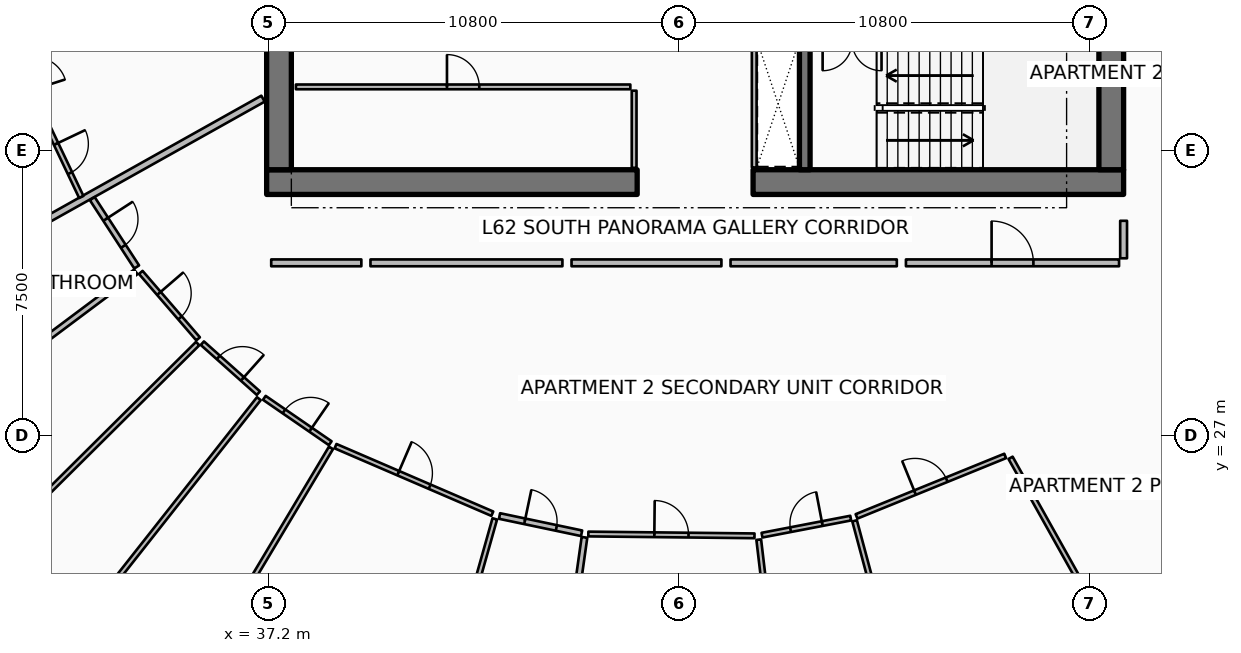
"""IFC4 building model, lengths in metres.
Left out: names, types, materials, properties, quantities, classifications, styles, units other than length and angle.
Written with IfcOpenShell. Run it as: python <this file> out.ifc"""

import sys

from ifc_helpers import new_model, si_unit, direction, frame, frame_2d, origin, place, context, subcontext, project, spatial, rectangle, extrude, element, fill, save


model = new_model("IFC4")
c1 = context("Model", 3, precision=1e-05, world=origin(), true_north=direction((0.0, 1.0)))
c2 = subcontext(c1, "Body", "Model", "MODEL_VIEW")
j1 = project(units=[si_unit("LENGTHUNIT", "METRE"), si_unit("PLANEANGLEUNIT", "RADIAN")], contexts=[c1])
p1 = place(None, origin())
s1 = spatial("IfcSite", under=j1, at=p1, CompositionType="ELEMENT")
p2 = place(p1, origin())
s2 = spatial("IfcBuilding", under=s1, at=p2, CompositionType="ELEMENT")
p3 = place(p2, frame((0.0, 0.0, 248.25)))
s3 = spatial("IfcBuildingStorey", under=s2, at=p3, CompositionType="ELEMENT", Elevation=248.25)
for number, where, z_axis, x_axis in (
    (1, (37.15, 33.675, 0.0), (0.0, 0.0, 1.0), (1.0, 0.0, 0.0)),
    (2, (49.95, 33.675, 0.0), (0.0, 0.0, 1.0), (1.0, 0.0, 0.0)),
):
    element("IfcWall", number, at=place(p3, frame(where, z_axis=z_axis, x_axis=x_axis)), inside=s3, PredefinedType="SHEAR", context=c2, shape_type="SweptSolid", body=[
        extrude(rectangle(XDim=9.75, YDim=0.65, at=frame_2d((4.875, 0.0))), origin(), (0.0, 0.0, 1.0), 3.85),
    ])
for number, where, z_axis, x_axis in (
    (3, (37.475, 34.0, 0.0), (0.0, 0.0, 1.0), (0.0, 1.0, 0.0)),
    (4, (59.375, 34.0, 0.0), (0.0, 0.0, 1.0), (0.0, 1.0, 0.0)),
):
    element("IfcWall", number, at=place(p3, frame(where, z_axis=z_axis, x_axis=x_axis)), inside=s3, PredefinedType="SHEAR", context=c2, shape_type="SweptSolid", body=[
        extrude(rectangle(XDim=16.0, YDim=0.65, at=frame_2d((8.0, 0.0))), origin(), (0.0, 0.0, 1.0), 3.85),
    ])
p4 = place(p3, frame((51.31, 34.0, 0.0), z_axis=(0.0, 0.0, 1.0), x_axis=(0.0, 1.0, 0.0)))
e5 = element("IfcWall", 5, at=p4, inside=s3, PredefinedType="SHEAR", context=c2, shape_type="SweptSolid", body=[
    extrude(rectangle(XDim=3.5, YDim=0.28, at=frame_2d((1.75, 0.0))), origin(), (0.0, 0.0, 1.0), 3.85),
])
p5 = place(p3, frame((46.82, 34.05, 0.0), z_axis=(0.0, 0.0, 1.0), x_axis=(0.0, 1.0, 0.0)))
e6 = element("IfcWall", 6, at=p5, inside=s3, PredefinedType="PARTITIONING", context=c2, shape_type="SweptSolid", body=[
    extrude(rectangle(XDim=2.03, YDim=0.125, at=frame_2d((1.015, 0.0))), origin(), (0.0, 0.0, 1.0), 3.03),
])
p6 = place(p3, frame((37.92, 36.18, 0.0), z_axis=(0.0, 0.0, 1.0), x_axis=(1.0, 0.0, 0.0)))
e7 = element("IfcWall", 7, at=p6, inside=s3, PredefinedType="PARTITIONING", context=c2, shape_type="SweptSolid", body=[
    extrude(rectangle(XDim=8.8, YDim=0.125, at=frame_2d((4.4, 0.0))), origin(), (0.0, 0.0, 1.0), 3.03),
])
p7 = place(p6, frame((3.975, 0.0, 0.0)))
e8 = element("IfcOpeningElement", 8, at=p7, cuts=e7, PredefinedType="OPENING", context=c2, shape_type="SweptSolid", body=[
    extrude(rectangle(XDim=0.85, YDim=2.06, at=frame_2d((0.425, 1.03))), frame((0.0, 0.073, 0.0), z_axis=(0.0, -1.0, 0.0), x_axis=(1.0, 0.0, 0.0)), (0.0, 0.0, 1.0), 0.145),
])
p8 = place(p3, frame((49.98, 34.06, 0.0), z_axis=(0.0, 0.0, 1.0), x_axis=(0.0, 1.0, 0.0)))
e9 = element("IfcWall", 9, at=p8, inside=s3, PredefinedType="PARTITIONING", context=c2, shape_type="SweptSolid", body=[
    extrude(rectangle(XDim=3.4, YDim=0.125, at=frame_2d((1.7, 0.0))), origin(), (0.0, 0.0, 1.0), 3.03),
])
p9 = place(p3, frame((37.054, 35.87, 0.0), z_axis=(0.0, 0.0, 1.0), x_axis=(-0.872490186067, -0.488631635506, 0.0)))
e10 = element("IfcWall", 10, at=p9, inside=s3, PredefinedType="PARTITIONING", context=c2, shape_type="SweptSolid", body=[
    extrude(rectangle(XDim=17.884, YDim=0.18, at=frame_2d((8.942, 0.0))), origin(), (0.0, 0.0, 1.0), 2.957),
])
p10 = place(p3, frame((31.31, 35.306, 0.0), z_axis=(0.0, 0.0, 1.0), x_axis=(0.429468098594, -0.903082029657, 0.0)))
e11 = element("IfcWall", 11, at=p10, inside=s3, PredefinedType="PARTITIONING", context=c2, shape_type="SweptSolid", body=[
    extrude(rectangle(XDim=2.24, YDim=0.125, at=frame_2d((1.12, 0.0))), origin(), (0.0, 0.0, 1.0), 2.957),
])
p11 = place(p10, frame((0.695, 0.0, 0.0)))
e12 = element("IfcOpeningElement", 12, at=p11, cuts=e11, PredefinedType="OPENING", context=c2, shape_type="SweptSolid", body=[
    extrude(rectangle(XDim=0.85, YDim=2.06, at=frame_2d((0.425, 1.03))), frame((0.0, 0.073, 0.0), z_axis=(0.0, -1.0, 0.0), x_axis=(1.0, 0.0, 0.0)), (0.0, 0.0, 1.0), 0.145),
])
p12 = place(p3, frame((53.972, 31.55, 0.0), z_axis=(0.0, 0.0, 1.0), x_axis=(1.0, 0.0, 0.0)))
e13 = element("IfcWall", 13, at=p12, inside=s3, PredefinedType="PARTITIONING", context=c2, shape_type="SweptSolid", body=[
    extrude(rectangle(XDim=5.608, YDim=0.18, at=frame_2d((2.804, 0.0))), origin(), (0.0, 0.0, 1.0), 2.957),
])
p13 = place(p12, frame((2.254, 0.0, 0.0)))
e14 = element("IfcOpeningElement", 14, at=p13, cuts=e13, PredefinedType="OPENING", context=c2, shape_type="SweptSolid", body=[
    extrude(rectangle(XDim=1.1, YDim=2.1, at=frame_2d((0.55, 1.05))), frame((0.0, 0.1, 0.0), z_axis=(0.0, -1.0, 0.0), x_axis=(1.0, 0.0, 0.0)), (0.0, 0.0, 1.0), 0.2),
])
p14 = place(p3, frame((59.7, 31.67, 0.0), z_axis=(0.0, 0.0, 1.0), x_axis=(0.0, 1.0, 0.0)))
e15 = element("IfcWall", 15, at=p14, inside=s3, PredefinedType="PARTITIONING", context=c2, shape_type="SweptSolid", body=[
    extrude(rectangle(XDim=0.987, YDim=0.18, at=frame_2d((0.493, 0.0))), origin(), (0.0, 0.0, 1.0), 2.957),
])
p15 = place(p3, frame((37.27, 31.55, 0.0), z_axis=(0.0, 0.0, 1.0), x_axis=(1.0, 0.0, 0.0)))
e16 = element("IfcWall", 16, at=p15, inside=s3, PredefinedType="PARTITIONING", context=c2, shape_type="SweptSolid", body=[
    extrude(rectangle(XDim=2.372, YDim=0.18, at=frame_2d((1.186, 0.0))), origin(), (0.0, 0.0, 1.0), 2.957),
])
p16 = place(p3, frame((32.562, 33.24, 0.0), z_axis=(0.0, 0.0, 1.0), x_axis=(0.544888302375, -0.838508639154, 0.0)))
e17 = element("IfcWall", 17, at=p16, inside=s3, PredefinedType="PARTITIONING", context=c2, shape_type="SweptSolid", body=[
    extrude(rectangle(XDim=2.144, YDim=0.15, at=frame_2d((1.072, 0.0))), origin(), (0.0, 0.0, 1.0), 2.957),
])
p17 = place(p16, frame((0.647, 0.0, 0.0)))
e18 = element("IfcOpeningElement", 18, at=p17, cuts=e17, PredefinedType="OPENING", context=c2, shape_type="SweptSolid", body=[
    extrude(rectangle(XDim=0.85, YDim=2.06, at=frame_2d((0.425, 1.03))), frame((0.0, 0.085, 0.0), z_axis=(0.0, -1.0, 0.0), x_axis=(1.0, 0.0, 0.0)), (0.0, 0.0, 1.0), 0.17),
])
p18 = place(p3, frame((33.707, 31.312, 0.0), z_axis=(0.0, 0.0, 1.0), x_axis=(-0.800889069655, -0.598812740435, 0.0)))
e19 = element("IfcWall", 19, at=p18, inside=s3, PredefinedType="PARTITIONING", context=c2, shape_type="SweptSolid", body=[
    extrude(rectangle(XDim=3.72, YDim=0.15, at=frame_2d((1.86, 0.0))), origin(), (0.0, 0.0, 1.0), 3.03),
])
p19 = place(p3, frame((35.335, 29.426, 0.0), z_axis=(0.0, 0.0, 1.0), x_axis=(-0.709660425086, -0.704543881576, 0.0)))
e20 = element("IfcWall", 20, at=p19, inside=s3, PredefinedType="PARTITIONING", context=c2, shape_type="SweptSolid", body=[
    extrude(rectangle(XDim=11.738, YDim=0.125, at=frame_2d((5.869, 0.0))), origin(), (0.0, 0.0, 1.0), 3.03),
])
p20 = place(p3, frame((33.838, 31.298, 0.0), z_axis=(0.0, 0.0, 1.0), x_axis=(0.653278423857, -0.757117758954, 0.0)))
e21 = element("IfcWall", 21, at=p20, inside=s3, PredefinedType="PARTITIONING", context=c2, shape_type="SweptSolid", body=[
    extrude(rectangle(XDim=2.309, YDim=0.125, at=frame_2d((1.154, 0.0))), origin(), (0.0, 0.0, 1.0), 3.03),
])
p21 = place(p20, frame((0.729, 0.0, 0.0)))
e22 = element("IfcOpeningElement", 22, at=p21, cuts=e21, PredefinedType="OPENING", context=c2, shape_type="SweptSolid", body=[
    extrude(rectangle(XDim=0.85, YDim=2.06, at=frame_2d((0.425, 1.03))), frame((0.0, 0.073, 0.0), z_axis=(0.0, -1.0, 0.0), x_axis=(1.0, 0.0, 0.0)), (0.0, 0.0, 1.0), 0.145),
])
p22 = place(p3, frame((35.458, 29.436, 0.0), z_axis=(0.0, 0.0, 1.0), x_axis=(0.746255603185, -0.665659503586, 0.0)))
e23 = element("IfcWall", 23, at=p22, inside=s3, PredefinedType="PARTITIONING", context=c2, shape_type="SweptSolid", body=[
    extrude(rectangle(XDim=1.975, YDim=0.125, at=frame_2d((0.988, 0.0))), origin(), (0.0, 0.0, 1.0), 2.957),
])
p23 = place(p22, frame((0.562, 0.0, 0.0)))
e24 = element("IfcOpeningElement", 24, at=p23, cuts=e23, PredefinedType="OPENING", context=c2, shape_type="SweptSolid", body=[
    extrude(rectangle(XDim=0.85, YDim=2.06, at=frame_2d((0.425, 1.03))), frame((0.0, 0.073, 0.0), z_axis=(0.0, -1.0, 0.0), x_axis=(1.0, 0.0, 0.0)), (0.0, 0.0, 1.0), 0.145),
])
p24 = place(p3, frame((39.882, 31.55, 0.0), z_axis=(0.0, 0.0, 1.0), x_axis=(1.0, 0.0, 0.0)))
e25 = element("IfcWall", 25, at=p24, inside=s3, PredefinedType="PARTITIONING", context=c2, shape_type="SweptSolid", body=[
    extrude(rectangle(XDim=5.051, YDim=0.18, at=frame_2d((2.525, 0.0))), origin(), (0.0, 0.0, 1.0), 2.957),
])
p25 = place(p3, frame((36.945, 27.977, 0.0), z_axis=(0.0, 0.0, 1.0), x_axis=(-0.619096573209, -0.785314862358, 0.0)))
e26 = element("IfcWall", 26, at=p25, inside=s3, PredefinedType="PARTITIONING", context=c2, shape_type="SweptSolid", body=[
    extrude(rectangle(XDim=11.739, YDim=0.125, at=frame_2d((5.869, 0.0))), origin(), (0.0, 0.0, 1.0), 2.957),
])
p26 = place(p3, frame((38.843, 26.681, 0.0), z_axis=(0.0, 0.0, 1.0), x_axis=(-0.513080899873, -0.858340253154, 0.0)))
e27 = element("IfcWall", 27, at=p26, inside=s3, PredefinedType="PARTITIONING", context=c2, shape_type="SweptSolid", body=[
    extrude(rectangle(XDim=10.282, YDim=0.125, at=frame_2d((5.141, 0.0))), origin(), (0.0, 0.0, 1.0), 3.03),
])
p27 = place(p3, frame((37.089, 27.998, 0.0), z_axis=(0.0, 0.0, 1.0), x_axis=(0.823534084839, -0.567266790063, 0.0)))
e28 = element("IfcWall", 28, at=p27, inside=s3, PredefinedType="PARTITIONING", context=c2, shape_type="SweptSolid", body=[
    extrude(rectangle(XDim=2.105, YDim=0.125, at=frame_2d((1.053, 0.0))), origin(), (0.0, 0.0, 1.0), 2.957),
])
p28 = place(p27, frame((0.628, 0.0, 0.0)))
e29 = element("IfcOpeningElement", 29, at=p28, cuts=e28, PredefinedType="OPENING", context=c2, shape_type="SweptSolid", body=[
    extrude(rectangle(XDim=0.85, YDim=2.06, at=frame_2d((0.425, 1.03))), frame((0.0, 0.073, 0.0), z_axis=(0.0, -1.0, 0.0), x_axis=(1.0, 0.0, 0.0)), (0.0, 0.0, 1.0), 0.145),
])
p29 = place(p3, frame((38.962, 26.727, 0.0), z_axis=(0.0, 0.0, 1.0), x_axis=(0.918384361194, -0.395689480671, 0.0)))
e30 = element("IfcWall", 30, at=p29, inside=s3, PredefinedType="PARTITIONING", context=c2, shape_type="SweptSolid", body=[
    extrude(rectangle(XDim=4.492, YDim=0.125, at=frame_2d((2.246, 0.0))), origin(), (0.0, 0.0, 1.0), 2.957),
])
p30 = place(p29, frame((1.796, 0.0, 0.0)))
e31 = element("IfcOpeningElement", 31, at=p30, cuts=e30, PredefinedType="OPENING", context=c2, shape_type="SweptSolid", body=[
    extrude(rectangle(XDim=0.9, YDim=2.08, at=frame_2d((0.45, 1.04))), frame((0.0, 0.073, 0.0), z_axis=(0.0, -1.0, 0.0), x_axis=(1.0, 0.0, 0.0)), (0.0, 0.0, 1.0), 0.145),
])
p31 = place(p3, frame((45.173, 31.55, 0.0), z_axis=(0.0, 0.0, 1.0), x_axis=(1.0, 0.0, 0.0)))
e32 = element("IfcWall", 32, at=p31, inside=s3, PredefinedType="PARTITIONING", context=c2, shape_type="SweptSolid", body=[
    extrude(rectangle(XDim=3.944, YDim=0.18, at=frame_2d((1.972, 0.0))), origin(), (0.0, 0.0, 1.0), 2.957),
])
p32 = place(p3, frame((43.153, 24.813, 0.0), z_axis=(0.0, 0.0, 1.0), x_axis=(-0.271434117828, -0.96245702225, 0.0)))
e33 = element("IfcWall", 33, at=p32, inside=s3, PredefinedType="PARTITIONING", context=c2, shape_type="SweptSolid", body=[
    extrude(rectangle(XDim=9.128, YDim=0.125, at=frame_2d((4.564, 0.0))), origin(), (0.0, 0.0, 1.0), 2.957),
])
p33 = place(p3, frame((43.278, 24.889, 0.0), z_axis=(0.0, 0.0, 1.0), x_axis=(0.978579118273, -0.205871098701, 0.0)))
e34 = element("IfcWall", 34, at=p33, inside=s3, PredefinedType="PARTITIONING", context=c2, shape_type="SweptSolid", body=[
    extrude(rectangle(XDim=2.207, YDim=0.15, at=frame_2d((1.104, 0.0))), origin(), (0.0, 0.0, 1.0), 2.957),
])
p34 = place(p33, frame((0.678, 0.0, 0.0)))
e35 = element("IfcOpeningElement", 35, at=p34, cuts=e34, PredefinedType="OPENING", context=c2, shape_type="SweptSolid", body=[
    extrude(rectangle(XDim=0.85, YDim=2.06, at=frame_2d((0.425, 1.03))), frame((0.0, 0.085, 0.0), z_axis=(0.0, -1.0, 0.0), x_axis=(1.0, 0.0, 0.0)), (0.0, 0.0, 1.0), 0.17),
])
p35 = place(p3, frame((45.513, 24.327, 0.0), z_axis=(0.0, 0.0, 1.0), x_axis=(-0.139367219172, -0.990240767804, 0.0)))
e36 = element("IfcWall", 36, at=p35, inside=s3, PredefinedType="PARTITIONING", context=c2, shape_type="SweptSolid", body=[
    extrude(rectangle(XDim=4.46, YDim=0.15, at=frame_2d((2.23, 0.0))), origin(), (0.0, 0.0, 1.0), 3.03),
])
p36 = place(p3, frame((45.615, 24.415, 0.0), z_axis=(0.0, 0.0, 1.0), x_axis=(0.999939484605, -0.011001233021, 0.0)))
e37 = element("IfcWall", 37, at=p36, inside=s3, PredefinedType="PARTITIONING", context=c2, shape_type="SweptSolid", body=[
    extrude(rectangle(XDim=4.372, YDim=0.125, at=frame_2d((2.186, 0.0))), origin(), (0.0, 0.0, 1.0), 3.03),
])
p37 = place(p36, frame((1.736, 0.0, 0.0)))
e38 = element("IfcOpeningElement", 38, at=p37, cuts=e37, PredefinedType="OPENING", context=c2, shape_type="SweptSolid", body=[
    extrude(rectangle(XDim=0.9, YDim=2.08, at=frame_2d((0.45, 1.04))), frame((0.0, 0.073, 0.0), z_axis=(0.0, -1.0, 0.0), x_axis=(1.0, 0.0, 0.0)), (0.0, 0.0, 1.0), 0.145),
])
p38 = place(p3, frame((49.357, 31.55, 0.0), z_axis=(0.0, 0.0, 1.0), x_axis=(1.0, 0.0, 0.0)))
e39 = element("IfcWall", 39, at=p38, inside=s3, PredefinedType="PARTITIONING", context=c2, shape_type="SweptSolid", body=[
    extrude(rectangle(XDim=4.376, YDim=0.18, at=frame_2d((2.188, 0.0))), origin(), (0.0, 0.0, 1.0), 2.957),
])
p39 = place(p3, frame((50.099, 24.267, 0.0), z_axis=(0.0, 0.0, 1.0), x_axis=(0.117541429875, -0.993067979679, 0.0)))
e40 = element("IfcWall", 40, at=p39, inside=s3, PredefinedType="PARTITIONING", context=c2, shape_type="SweptSolid", body=[
    extrude(rectangle(XDim=6.838, YDim=0.125, at=frame_2d((3.419, 0.0))), origin(), (0.0, 0.0, 1.0), 2.957),
])
p40 = place(p3, frame((56.725, 26.42, 0.0), z_axis=(0.0, 0.0, 1.0), x_axis=(0.488624332812, -0.872494275846, 0.0)))
e41 = element("IfcWall", 41, at=p40, inside=s3, PredefinedType="PARTITIONING", context=c2, shape_type="SweptSolid", body=[
    extrude(rectangle(XDim=6.738, YDim=0.125, at=frame_2d((3.369, 0.0))), origin(), (0.0, 0.0, 1.0), 2.957),
])
p41 = place(p3, frame((52.621, 24.762, 0.0), z_axis=(0.0, 0.0, 1.0), x_axis=(0.258970884365, -0.96588512829, 0.0)))
e42 = element("IfcWall", 42, at=p41, inside=s3, PredefinedType="PARTITIONING", context=c2, shape_type="SweptSolid", body=[
    extrude(rectangle(XDim=6.306, YDim=0.125, at=frame_2d((3.153, 0.0))), origin(), (0.0, 0.0, 1.0), 3.03),
])
p42 = place(p3, frame((50.185, 24.385, 0.0), z_axis=(0.0, 0.0, 1.0), x_axis=(0.982037935844, 0.188683577884, 0.0)))
e43 = element("IfcWall", 43, at=p42, inside=s3, PredefinedType="PARTITIONING", context=c2, shape_type="SweptSolid", body=[
    extrude(rectangle(XDim=2.377, YDim=0.125, at=frame_2d((1.188, 0.0))), origin(), (0.0, 0.0, 1.0), 2.957),
])
p43 = place(p42, frame((0.763, 0.0, 0.0)))
e44 = element("IfcOpeningElement", 44, at=p43, cuts=e43, PredefinedType="OPENING", context=c2, shape_type="SweptSolid", body=[
    extrude(rectangle(XDim=0.85, YDim=2.06, at=frame_2d((0.425, 1.03))), frame((0.0, 0.073, 0.0), z_axis=(0.0, -1.0, 0.0), x_axis=(1.0, 0.0, 0.0)), (0.0, 0.0, 1.0), 0.145),
])
p44 = place(p3, frame((52.672, 24.879, 0.0), z_axis=(0.0, 0.0, 1.0), x_axis=(0.926344303187, 0.376677888857, 0.0)))
e45 = element("IfcWall", 45, at=p44, inside=s3, PredefinedType="PARTITIONING", context=c2, shape_type="SweptSolid", body=[
    extrude(rectangle(XDim=4.223, YDim=0.125, at=frame_2d((2.111, 0.0))), origin(), (0.0, 0.0, 1.0), 2.957),
])
p45 = place(p44, frame((1.661, 0.0, 0.0)))
e46 = element("IfcOpeningElement", 46, at=p45, cuts=e45, PredefinedType="OPENING", context=c2, shape_type="SweptSolid", body=[
    extrude(rectangle(XDim=0.9, YDim=2.08, at=frame_2d((0.45, 1.04))), frame((0.0, 0.073, 0.0), z_axis=(0.0, -1.0, 0.0), x_axis=(1.0, 0.0, 0.0)), (0.0, 0.0, 1.0), 0.145),
])
p46 = place(p7, origin())
e47 = element("IfcDoor", 47, at=p46, inside=s3, OperationType="SINGLE_SWING_LEFT", PredefinedType="DOOR", context=c2, shape_type="SweptSolid", body=[
    extrude(rectangle(XDim=0.85, YDim=2.06, at=frame_2d((0.425, 1.03))), frame((0.0, 0.025, 0.0), z_axis=(0.0, -1.0, 0.0), x_axis=(1.0, 0.0, 0.0)), (0.0, 0.0, 1.0), 0.05),
])
fill(e8, e47)
p47 = place(p11, origin())
e48 = element("IfcDoor", 48, at=p47, inside=s3, OperationType="SINGLE_SWING_LEFT", PredefinedType="DOOR", context=c2, shape_type="SweptSolid", body=[
    extrude(rectangle(XDim=0.85, YDim=2.06, at=frame_2d((0.425, 1.03))), frame((0.0, 0.025, 0.0), z_axis=(0.0, -1.0, 0.0), x_axis=(1.0, 0.0, 0.0)), (0.0, 0.0, 1.0), 0.05),
])
fill(e12, e48)
p48 = place(p13, origin())
e49 = element("IfcDoor", 49, at=p48, inside=s3, OperationType="SINGLE_SWING_LEFT", PredefinedType="DOOR", context=c2, shape_type="SweptSolid", body=[
    extrude(rectangle(XDim=1.1, YDim=2.1, at=frame_2d((0.55, 1.05))), frame((0.0, 0.025, 0.0), z_axis=(0.0, -1.0, 0.0), x_axis=(1.0, 0.0, 0.0)), (0.0, 0.0, 1.0), 0.05),
])
fill(e14, e49)
p49 = place(p17, origin())
e50 = element("IfcDoor", 50, at=p49, inside=s3, OperationType="SINGLE_SWING_LEFT", PredefinedType="DOOR", context=c2, shape_type="SweptSolid", body=[
    extrude(rectangle(XDim=0.85, YDim=2.06, at=frame_2d((0.425, 1.03))), frame((0.0, 0.025, 0.0), z_axis=(0.0, -1.0, 0.0), x_axis=(1.0, 0.0, 0.0)), (0.0, 0.0, 1.0), 0.05),
])
fill(e18, e50)
p50 = place(p21, origin())
e51 = element("IfcDoor", 51, at=p50, inside=s3, OperationType="SINGLE_SWING_LEFT", PredefinedType="DOOR", context=c2, shape_type="SweptSolid", body=[
    extrude(rectangle(XDim=0.85, YDim=2.06, at=frame_2d((0.425, 1.03))), frame((0.0, 0.025, 0.0), z_axis=(0.0, -1.0, 0.0), x_axis=(1.0, 0.0, 0.0)), (0.0, 0.0, 1.0), 0.05),
])
fill(e22, e51)
p51 = place(p23, origin())
e52 = element("IfcDoor", 52, at=p51, inside=s3, OperationType="SINGLE_SWING_RIGHT", PredefinedType="DOOR", context=c2, shape_type="SweptSolid", body=[
    extrude(rectangle(XDim=0.85, YDim=2.06, at=frame_2d((0.425, 1.03))), frame((0.0, 0.025, 0.0), z_axis=(0.0, -1.0, 0.0), x_axis=(1.0, 0.0, 0.0)), (0.0, 0.0, 1.0), 0.05),
])
fill(e24, e52)
p52 = place(p28, origin())
e53 = element("IfcDoor", 53, at=p52, inside=s3, OperationType="SINGLE_SWING_RIGHT", PredefinedType="DOOR", context=c2, shape_type="SweptSolid", body=[
    extrude(rectangle(XDim=0.85, YDim=2.06, at=frame_2d((0.425, 1.03))), frame((0.0, 0.025, 0.0), z_axis=(0.0, -1.0, 0.0), x_axis=(1.0, 0.0, 0.0)), (0.0, 0.0, 1.0), 0.05),
])
fill(e29, e53)
p53 = place(p30, origin())
e54 = element("IfcDoor", 54, at=p53, inside=s3, OperationType="SINGLE_SWING_LEFT", PredefinedType="DOOR", context=c2, shape_type="SweptSolid", body=[
    extrude(rectangle(XDim=0.9, YDim=2.08, at=frame_2d((0.45, 1.04))), frame((0.0, 0.025, 0.0), z_axis=(0.0, -1.0, 0.0), x_axis=(1.0, 0.0, 0.0)), (0.0, 0.0, 1.0), 0.05),
])
fill(e31, e54)
p54 = place(p34, origin())
e55 = element("IfcDoor", 55, at=p54, inside=s3, OperationType="SINGLE_SWING_LEFT", PredefinedType="DOOR", context=c2, shape_type="SweptSolid", body=[
    extrude(rectangle(XDim=0.85, YDim=2.06, at=frame_2d((0.425, 1.03))), frame((0.0, 0.025, 0.0), z_axis=(0.0, -1.0, 0.0), x_axis=(1.0, 0.0, 0.0)), (0.0, 0.0, 1.0), 0.05),
])
fill(e35, e55)
p55 = place(p37, origin())
e56 = element("IfcDoor", 56, at=p55, inside=s3, OperationType="SINGLE_SWING_LEFT", PredefinedType="DOOR", context=c2, shape_type="SweptSolid", body=[
    extrude(rectangle(XDim=0.9, YDim=2.08, at=frame_2d((0.45, 1.04))), frame((0.0, 0.025, 0.0), z_axis=(0.0, -1.0, 0.0), x_axis=(1.0, 0.0, 0.0)), (0.0, 0.0, 1.0), 0.05),
])
fill(e38, e56)
p56 = place(p43, origin())
e57 = element("IfcDoor", 57, at=p56, inside=s3, OperationType="SINGLE_SWING_RIGHT", PredefinedType="DOOR", context=c2, shape_type="SweptSolid", body=[
    extrude(rectangle(XDim=0.85, YDim=2.06, at=frame_2d((0.425, 1.03))), frame((0.0, 0.025, 0.0), z_axis=(0.0, -1.0, 0.0), x_axis=(1.0, 0.0, 0.0)), (0.0, 0.0, 1.0), 0.05),
])
fill(e44, e57)
p57 = place(p45, origin())
e58 = element("IfcDoor", 58, at=p57, inside=s3, OperationType="SINGLE_SWING_LEFT", PredefinedType="DOOR", context=c2, shape_type="SweptSolid", body=[
    extrude(rectangle(XDim=0.9, YDim=2.08, at=frame_2d((0.45, 1.04))), frame((0.0, 0.025, 0.0), z_axis=(0.0, -1.0, 0.0), x_axis=(1.0, 0.0, 0.0)), (0.0, 0.0, 1.0), 0.05),
])
fill(e46, e58)
save(model, sys.argv[1])
